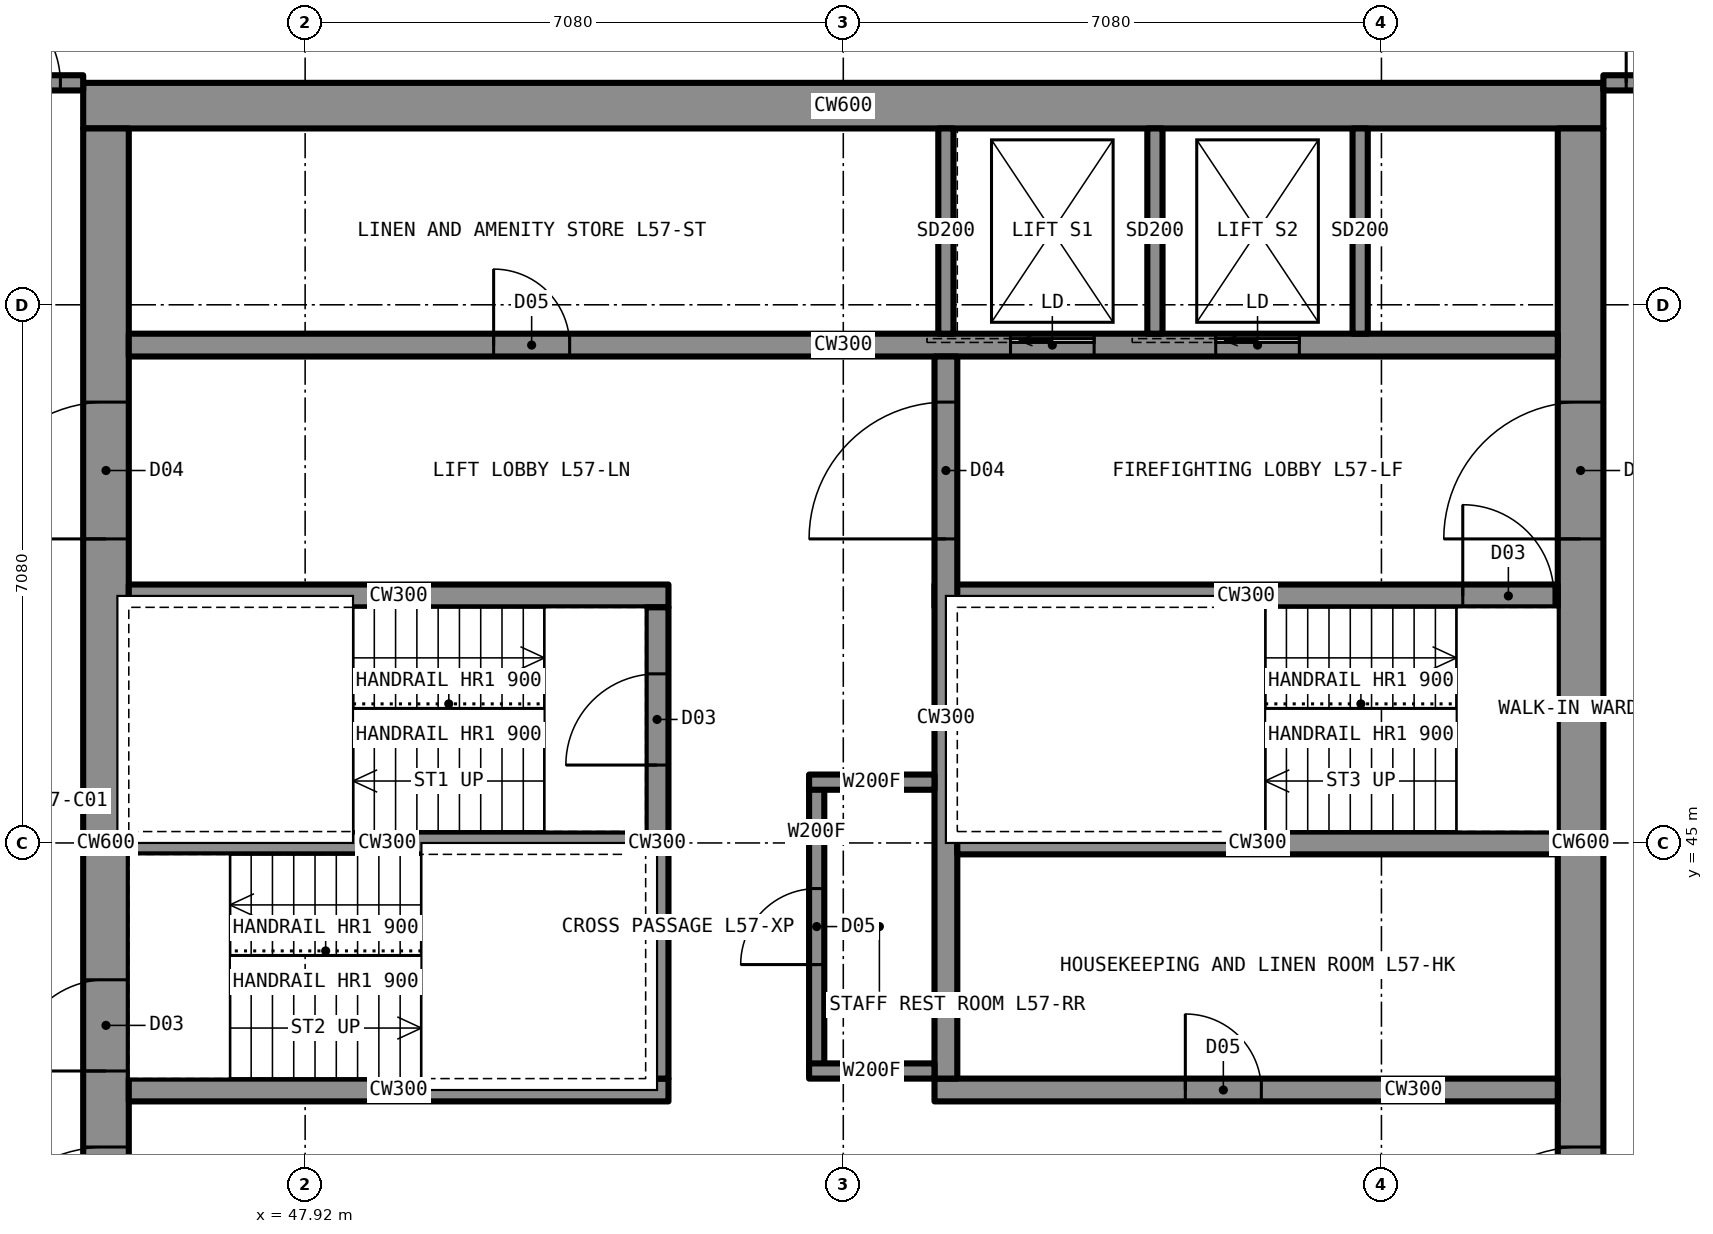
"""IFC4 building model, lengths in metres.
Left out: names, types, materials, properties, quantities, classifications, styles, units other than length and angle.
Written with IfcOpenShell. Run it as: python <this file> out.ifc"""

import sys

from ifc_helpers import new_model, si_unit, direction, frame, frame_2d, origin, place, context, subcontext, project, spatial, rectangle, extrude, element, fill, save


model = new_model("IFC4")
c1 = context("Model", 3, precision=1e-05, world=origin(), true_north=direction((0.0, 1.0)))
c2 = subcontext(c1, "Body", "Model", "MODEL_VIEW")
j1 = project(units=[si_unit("LENGTHUNIT", "METRE"), si_unit("PLANEANGLEUNIT", "RADIAN")], contexts=[c1])
p1 = place(None, origin())
s1 = spatial("IfcSite", under=j1, at=p1, CompositionType="ELEMENT")
p2 = place(p1, origin())
s2 = spatial("IfcBuilding", under=s1, at=p2, CompositionType="ELEMENT")
p3 = place(p2, frame((0.0, 0.0, 203.8)))
s3 = spatial("IfcBuildingStorey", under=s2, at=p3, CompositionType="ELEMENT", Elevation=203.8)
p4 = place(p3, frame((45.0, 54.7, 0.0), z_axis=(0.0, 0.0, 1.0), x_axis=(1.0, 0.0, 0.0)))
e1 = element("IfcWall", 1, at=p4, inside=s3, PredefinedType="SHEAR", context=c2, shape_type="SweptSolid", body=[
    extrude(rectangle(XDim=20.0, YDim=0.6, at=frame_2d((10.0, 0.0))), origin(), (0.0, 0.0, 1.0), 3.5),
])
p5 = place(p3, frame((64.7, 35.6, 0.0), z_axis=(0.0, 0.0, 1.0), x_axis=(0.0, 1.0, 0.0)))
e2 = element("IfcWall", 2, at=p5, inside=s3, PredefinedType="SHEAR", context=c2, shape_type="SweptSolid", body=[
    extrude(rectangle(XDim=18.8, YDim=0.6, at=frame_2d((9.4, 0.0))), origin(), (0.0, 0.0, 1.0), 3.5),
])
p6 = place(p5, frame((13.4, 0.0, 0.0)))
e3 = element("IfcOpeningElement", 3, at=p6, cuts=e2, PredefinedType="OPENING", context=c2, shape_type="SweptSolid", body=[
    extrude(rectangle(XDim=1.8, YDim=2.2, at=frame_2d((0.9, 1.1))), frame((0.0, 0.31, 0.0), z_axis=(0.0, -1.0, 0.0), x_axis=(1.0, 0.0, 0.0)), (0.0, 0.0, 1.0), 0.62),
])
p7 = place(p5, frame((3.6, 0.0, 0.0)))
e4 = element("IfcOpeningElement", 4, at=p7, cuts=e2, PredefinedType="OPENING", context=c2, shape_type="SweptSolid", body=[
    extrude(rectangle(XDim=1.8, YDim=2.2, at=frame_2d((0.9, 1.1))), frame((0.0, 0.31, 0.0), z_axis=(0.0, -1.0, 0.0), x_axis=(1.0, 0.0, 0.0)), (0.0, 0.0, 1.0), 0.62),
])
p8 = place(p3, frame((45.3, 35.6, 0.0), z_axis=(0.0, 0.0, 1.0), x_axis=(0.0, 1.0, 0.0)))
e5 = element("IfcWall", 5, at=p8, inside=s3, PredefinedType="SHEAR", context=c2, shape_type="SweptSolid", body=[
    extrude(rectangle(XDim=18.8, YDim=0.6, at=frame_2d((9.4, 0.0))), origin(), (0.0, 0.0, 1.0), 3.5),
])
p9 = place(p8, frame((13.4, 0.0, 0.0)))
e6 = element("IfcOpeningElement", 6, at=p9, cuts=e5, PredefinedType="OPENING", context=c2, shape_type="SweptSolid", body=[
    extrude(rectangle(XDim=1.8, YDim=2.2, at=frame_2d((0.9, 1.1))), frame((0.0, 0.31, 0.0), z_axis=(0.0, -1.0, 0.0), x_axis=(1.0, 0.0, 0.0)), (0.0, 0.0, 1.0), 0.62),
])
p10 = place(p8, frame((3.6, 0.0, 0.0)))
e7 = element("IfcOpeningElement", 7, at=p10, cuts=e5, PredefinedType="OPENING", context=c2, shape_type="SweptSolid", body=[
    extrude(rectangle(XDim=1.8, YDim=2.2, at=frame_2d((0.9, 1.1))), frame((0.0, 0.31, 0.0), z_axis=(0.0, -1.0, 0.0), x_axis=(1.0, 0.0, 0.0)), (0.0, 0.0, 1.0), 0.62),
])
p11 = place(p8, frame((6.4, 0.0, 0.0)))
e8 = element("IfcOpeningElement", 8, at=p11, cuts=e5, PredefinedType="OPENING", context=c2, shape_type="SweptSolid", body=[
    extrude(rectangle(XDim=1.2, YDim=2.2, at=frame_2d((0.6, 1.1))), frame((0.0, 0.31, 0.0), z_axis=(0.0, -1.0, 0.0), x_axis=(1.0, 0.0, 0.0)), (0.0, 0.0, 1.0), 0.62),
])
p12 = place(p3, frame((45.6, 51.55, 0.0), z_axis=(0.0, 0.0, 1.0), x_axis=(1.0, 0.0, 0.0)))
e9 = element("IfcWall", 9, at=p12, inside=s3, PredefinedType="SHEAR", context=c2, shape_type="SweptSolid", body=[
    extrude(rectangle(XDim=18.8, YDim=0.3, at=frame_2d((9.4, 0.0))), origin(), (0.0, 0.0, 1.0), 3.5),
])
p13 = place(p12, frame((4.8, 0.0, 0.0)))
e10 = element("IfcOpeningElement", 10, at=p13, cuts=e9, PredefinedType="OPENING", context=c2, shape_type="SweptSolid", body=[
    extrude(rectangle(XDim=1.0, YDim=2.1, at=frame_2d((0.5, 1.05))), frame((0.0, 0.16, 0.0), z_axis=(0.0, -1.0, 0.0), x_axis=(1.0, 0.0, 0.0)), (0.0, 0.0, 1.0), 0.32),
])
p14 = place(p12, frame((11.6, 0.0, 0.0)))
e11 = element("IfcOpeningElement", 11, at=p14, cuts=e9, PredefinedType="OPENING", context=c2, shape_type="SweptSolid", body=[
    extrude(rectangle(XDim=1.1, YDim=2.2, at=frame_2d((0.55, 1.1))), frame((0.0, 0.16, 0.0), z_axis=(0.0, -1.0, 0.0), x_axis=(1.0, 0.0, 0.0)), (0.0, 0.0, 1.0), 0.32),
])
p15 = place(p12, frame((14.3, 0.0, 0.0)))
e12 = element("IfcOpeningElement", 12, at=p15, cuts=e9, PredefinedType="OPENING", context=c2, shape_type="SweptSolid", body=[
    extrude(rectangle(XDim=1.1, YDim=2.2, at=frame_2d((0.55, 1.1))), frame((0.0, 0.16, 0.0), z_axis=(0.0, -1.0, 0.0), x_axis=(1.0, 0.0, 0.0)), (0.0, 0.0, 1.0), 0.32),
])
p16 = place(p3, frame((45.6, 48.25, 0.0), z_axis=(0.0, 0.0, 1.0), x_axis=(1.0, 0.0, 0.0)))
e13 = element("IfcWall", 13, at=p16, inside=s3, PredefinedType="SHEAR", context=c2, shape_type="SweptSolid", body=[
    extrude(rectangle(XDim=7.1, YDim=0.3, at=frame_2d((3.55, 0.0))), origin(), (0.0, 0.0, 1.0), 3.5),
])
p17 = place(p3, frame((56.2, 48.25, 0.0), z_axis=(0.0, 0.0, 1.0), x_axis=(1.0, 0.0, 0.0)))
e14 = element("IfcWall", 14, at=p17, inside=s3, PredefinedType="SHEAR", context=c2, shape_type="SweptSolid", body=[
    extrude(rectangle(XDim=8.2, YDim=0.3, at=frame_2d((4.1, 0.0))), origin(), (0.0, 0.0, 1.0), 3.5),
])
p18 = place(p17, frame((6.95, 0.0, 0.0)))
e15 = element("IfcOpeningElement", 15, at=p18, cuts=e14, PredefinedType="OPENING", context=c2, shape_type="SweptSolid", body=[
    extrude(rectangle(XDim=1.2, YDim=2.2, at=frame_2d((0.6, 1.1))), frame((0.0, 0.16, 0.0), z_axis=(0.0, -1.0, 0.0), x_axis=(1.0, 0.0, 0.0)), (0.0, 0.0, 1.0), 0.32),
])
p19 = place(p3, frame((45.6, 41.75, 0.0), z_axis=(0.0, 0.0, 1.0), x_axis=(1.0, 0.0, 0.0)))
e16 = element("IfcWall", 16, at=p19, inside=s3, PredefinedType="SHEAR", context=c2, shape_type="SweptSolid", body=[
    extrude(rectangle(XDim=7.1, YDim=0.3, at=frame_2d((3.55, 0.0))), origin(), (0.0, 0.0, 1.0), 3.5),
])
p20 = place(p3, frame((56.2, 41.75, 0.0), z_axis=(0.0, 0.0, 1.0), x_axis=(1.0, 0.0, 0.0)))
e17 = element("IfcWall", 17, at=p20, inside=s3, PredefinedType="SHEAR", context=c2, shape_type="SweptSolid", body=[
    extrude(rectangle(XDim=8.2, YDim=0.3, at=frame_2d((4.1, 0.0))), origin(), (0.0, 0.0, 1.0), 3.5),
])
p21 = place(p20, frame((3.3, 0.0, 0.0)))
e18 = element("IfcOpeningElement", 18, at=p21, cuts=e17, PredefinedType="OPENING", context=c2, shape_type="SweptSolid", body=[
    extrude(rectangle(XDim=1.0, YDim=2.1, at=frame_2d((0.5, 1.05))), frame((0.0, 0.16, 0.0), z_axis=(0.0, -1.0, 0.0), x_axis=(1.0, 0.0, 0.0)), (0.0, 0.0, 1.0), 0.32),
])
p22 = place(p3, frame((52.55, 41.9, 0.0), z_axis=(0.0, 0.0, 1.0), x_axis=(0.0, 1.0, 0.0)))
e19 = element("IfcWall", 19, at=p22, inside=s3, PredefinedType="SHEAR", context=c2, shape_type="SweptSolid", body=[
    extrude(rectangle(XDim=6.2, YDim=0.3, at=frame_2d((3.1, 0.0))), origin(), (0.0, 0.0, 1.0), 3.5),
])
p23 = place(p22, frame((4.125, 0.0, 0.0)))
e20 = element("IfcOpeningElement", 20, at=p23, cuts=e19, PredefinedType="OPENING", context=c2, shape_type="SweptSolid", body=[
    extrude(rectangle(XDim=1.2, YDim=2.2, at=frame_2d((0.6, 1.1))), frame((0.0, 0.16, 0.0), z_axis=(0.0, -1.0, 0.0), x_axis=(1.0, 0.0, 0.0)), (0.0, 0.0, 1.0), 0.32),
])
p24 = place(p3, frame((56.35, 41.9, 0.0), z_axis=(0.0, 0.0, 1.0), x_axis=(0.0, 1.0, 0.0)))
e21 = element("IfcWall", 21, at=p24, inside=s3, PredefinedType="SHEAR", context=c2, shape_type="SweptSolid", body=[
    extrude(rectangle(XDim=9.5, YDim=0.3, at=frame_2d((4.75, 0.0))), origin(), (0.0, 0.0, 1.0), 3.5),
])
p25 = place(p24, frame((7.1, 0.0, 0.0)))
e22 = element("IfcOpeningElement", 22, at=p25, cuts=e21, PredefinedType="OPENING", context=c2, shape_type="SweptSolid", body=[
    extrude(rectangle(XDim=1.8, YDim=2.2, at=frame_2d((0.9, 1.1))), frame((0.0, 0.16, 0.0), z_axis=(0.0, -1.0, 0.0), x_axis=(1.0, 0.0, 0.0)), (0.0, 0.0, 1.0), 0.32),
])
p26 = place(p3, frame((45.6, 45.0, 0.0), z_axis=(0.0, 0.0, 1.0), x_axis=(1.0, 0.0, 0.0)))
e23 = element("IfcWall", 23, at=p26, inside=s3, PredefinedType="SHEAR", context=c2, shape_type="SweptSolid", body=[
    extrude(rectangle(XDim=6.8, YDim=0.3, at=frame_2d((3.4, 0.0))), origin(), (0.0, 0.0, 1.0), 3.5),
])
p27 = place(p3, frame((56.5, 45.0, 0.0), z_axis=(0.0, 0.0, 1.0), x_axis=(1.0, 0.0, 0.0)))
e24 = element("IfcWall", 24, at=p27, inside=s3, PredefinedType="SHEAR", context=c2, shape_type="SweptSolid", body=[
    extrude(rectangle(XDim=7.9, YDim=0.3, at=frame_2d((3.95, 0.0))), origin(), (0.0, 0.0, 1.0), 3.5),
])
p28 = place(p3, frame((43.2, 55.0, 0.0), z_axis=(0.0, 0.0, 1.0), x_axis=(1.0, 0.0, 0.0)))
e25 = element("IfcWall", 25, at=p28, inside=s3, PredefinedType="PARTITIONING", context=c2, shape_type="SweptSolid", body=[
    extrude(rectangle(XDim=1.8, YDim=0.2, at=frame_2d((0.9, 0.0))), origin(), (0.0, 0.0, 1.0), 3.33),
])
p29 = place(p28, frame((0.3, 0.0, 0.0)))
e26 = element("IfcOpeningElement", 26, at=p29, cuts=e25, PredefinedType="OPENING", context=c2, shape_type="SweptSolid", body=[
    extrude(rectangle(XDim=1.2, YDim=2.2, at=frame_2d((0.6, 1.1))), frame((0.0, 0.11, 0.0), z_axis=(0.0, -1.0, 0.0), x_axis=(1.0, 0.0, 0.0)), (0.0, 0.0, 1.0), 0.22),
])
p30 = place(p3, frame((65.0, 55.0, 0.0), z_axis=(0.0, 0.0, 1.0), x_axis=(1.0, 0.0, 0.0)))
e27 = element("IfcWall", 27, at=p30, inside=s3, PredefinedType="PARTITIONING", context=c2, shape_type="SweptSolid", body=[
    extrude(rectangle(XDim=1.8, YDim=0.2, at=frame_2d((0.9, 0.0))), origin(), (0.0, 0.0, 1.0), 3.33),
])
p31 = place(p30, frame((0.3, 0.0, 0.0)))
e28 = element("IfcOpeningElement", 28, at=p31, cuts=e27, PredefinedType="OPENING", context=c2, shape_type="SweptSolid", body=[
    extrude(rectangle(XDim=1.2, YDim=2.2, at=frame_2d((0.6, 1.1))), frame((0.0, 0.11, 0.0), z_axis=(0.0, -1.0, 0.0), x_axis=(1.0, 0.0, 0.0)), (0.0, 0.0, 1.0), 0.22),
])
for number, where, z_axis, x_axis in (
    (29, (59.1, 51.7, 0.0), (0.0, 0.0, 1.0), (0.0, 1.0, 0.0)),
    (30, (61.8, 51.7, 0.0), (0.0, 0.0, 1.0), (0.0, 1.0, 0.0)),
    (31, (56.35, 51.7, 0.0), (0.0, 0.0, 1.0), (0.0, 1.0, 0.0)),
):
    element("IfcWall", number, at=place(p3, frame(where, z_axis=z_axis, x_axis=x_axis)), inside=s3, PredefinedType="PARTITIONING", context=c2, shape_type="SweptSolid", body=[
        extrude(rectangle(XDim=2.7, YDim=0.2, at=frame_2d((1.35, 0.0))), origin(), (0.0, 0.0, 1.0), 3.33),
    ])
p32 = place(p29, origin())
e32 = element("IfcDoor", 32, at=p32, inside=s3, OperationType="SINGLE_SWING_LEFT", PredefinedType="DOOR", context=c2, shape_type="SweptSolid", body=[
    extrude(rectangle(XDim=1.2, YDim=2.2, at=frame_2d((0.6, 1.1))), frame((0.0, 0.025, 0.0), z_axis=(0.0, -1.0, 0.0), x_axis=(1.0, 0.0, 0.0)), (0.0, 0.0, 1.0), 0.05),
])
fill(e26, e32)
p33 = place(p31, origin())
e33 = element("IfcDoor", 33, at=p33, inside=s3, OperationType="SINGLE_SWING_LEFT", PredefinedType="DOOR", context=c2, shape_type="SweptSolid", body=[
    extrude(rectangle(XDim=1.2, YDim=2.2, at=frame_2d((0.6, 1.1))), frame((0.0, 0.025, 0.0), z_axis=(0.0, -1.0, 0.0), x_axis=(1.0, 0.0, 0.0)), (0.0, 0.0, 1.0), 0.05),
])
fill(e28, e33)
p34 = place(p9, origin())
e34 = element("IfcDoor", 34, at=p34, inside=s3, OperationType="DOUBLE_DOOR_SINGLE_SWING", PredefinedType="DOOR", context=c2, shape_type="SweptSolid", body=[
    extrude(rectangle(XDim=1.8, YDim=2.2, at=frame_2d((0.9, 1.1))), frame((0.0, 0.025, 0.0), z_axis=(0.0, -1.0, 0.0), x_axis=(1.0, 0.0, 0.0)), (0.0, 0.0, 1.0), 0.05),
])
fill(e6, e34)
p35 = place(p10, origin())
e35 = element("IfcDoor", 35, at=p35, inside=s3, OperationType="DOUBLE_DOOR_SINGLE_SWING", PredefinedType="DOOR", context=c2, shape_type="SweptSolid", body=[
    extrude(rectangle(XDim=1.8, YDim=2.2, at=frame_2d((0.9, 1.1))), frame((0.0, 0.025, 0.0), z_axis=(0.0, -1.0, 0.0), x_axis=(1.0, 0.0, 0.0)), (0.0, 0.0, 1.0), 0.05),
])
fill(e7, e35)
p36 = place(p6, origin())
e36 = element("IfcDoor", 36, at=p36, inside=s3, OperationType="DOUBLE_DOOR_SINGLE_SWING", PredefinedType="DOOR", context=c2, shape_type="SweptSolid", body=[
    extrude(rectangle(XDim=1.8, YDim=2.2, at=frame_2d((0.9, 1.1))), frame((0.0, 0.025, 0.0), z_axis=(0.0, -1.0, 0.0), x_axis=(1.0, 0.0, 0.0)), (0.0, 0.0, 1.0), 0.05),
])
fill(e3, e36)
p37 = place(p7, origin())
e37 = element("IfcDoor", 37, at=p37, inside=s3, OperationType="DOUBLE_DOOR_SINGLE_SWING", PredefinedType="DOOR", context=c2, shape_type="SweptSolid", body=[
    extrude(rectangle(XDim=1.8, YDim=2.2, at=frame_2d((0.9, 1.1))), frame((0.0, 0.025, 0.0), z_axis=(0.0, -1.0, 0.0), x_axis=(1.0, 0.0, 0.0)), (0.0, 0.0, 1.0), 0.05),
])
fill(e4, e37)
p38 = place(p25, origin())
e38 = element("IfcDoor", 38, at=p38, inside=s3, OperationType="DOUBLE_DOOR_SINGLE_SWING", PredefinedType="DOOR", context=c2, shape_type="SweptSolid", body=[
    extrude(rectangle(XDim=1.8, YDim=2.2, at=frame_2d((0.9, 1.1))), frame((0.0, 0.025, 0.0), z_axis=(0.0, -1.0, 0.0), x_axis=(1.0, 0.0, 0.0)), (0.0, 0.0, 1.0), 0.05),
])
fill(e22, e38)
p39 = place(p23, origin())
e39 = element("IfcDoor", 39, at=p39, inside=s3, OperationType="SINGLE_SWING_LEFT", PredefinedType="DOOR", context=c2, shape_type="SweptSolid", body=[
    extrude(rectangle(XDim=1.2, YDim=2.2, at=frame_2d((0.6, 1.1))), frame((0.0, 0.025, 0.0), z_axis=(0.0, -1.0, 0.0), x_axis=(1.0, 0.0, 0.0)), (0.0, 0.0, 1.0), 0.05),
])
fill(e20, e39)
p40 = place(p11, origin())
e40 = element("IfcDoor", 40, at=p40, inside=s3, OperationType="SINGLE_SWING_LEFT", PredefinedType="DOOR", context=c2, shape_type="SweptSolid", body=[
    extrude(rectangle(XDim=1.2, YDim=2.2, at=frame_2d((0.6, 1.1))), frame((0.0, 0.025, 0.0), z_axis=(0.0, -1.0, 0.0), x_axis=(1.0, 0.0, 0.0)), (0.0, 0.0, 1.0), 0.05),
])
fill(e8, e40)
p41 = place(p18, origin())
e41 = element("IfcDoor", 41, at=p41, inside=s3, OperationType="SINGLE_SWING_LEFT", PredefinedType="DOOR", context=c2, shape_type="SweptSolid", body=[
    extrude(rectangle(XDim=1.2, YDim=2.2, at=frame_2d((0.6, 1.1))), frame((0.0, 0.025, 0.0), z_axis=(0.0, -1.0, 0.0), x_axis=(1.0, 0.0, 0.0)), (0.0, 0.0, 1.0), 0.05),
])
fill(e15, e41)
p42 = place(p21, origin())
e42 = element("IfcDoor", 42, at=p42, inside=s3, OperationType="SINGLE_SWING_LEFT", PredefinedType="DOOR", context=c2, shape_type="SweptSolid", body=[
    extrude(rectangle(XDim=1.0, YDim=2.1, at=frame_2d((0.5, 1.05))), frame((0.0, 0.025, 0.0), z_axis=(0.0, -1.0, 0.0), x_axis=(1.0, 0.0, 0.0)), (0.0, 0.0, 1.0), 0.05),
])
fill(e18, e42)
p43 = place(p13, origin())
e43 = element("IfcDoor", 43, at=p43, inside=s3, OperationType="SINGLE_SWING_LEFT", PredefinedType="DOOR", context=c2, shape_type="SweptSolid", body=[
    extrude(rectangle(XDim=1.0, YDim=2.1, at=frame_2d((0.5, 1.05))), frame((0.0, 0.025, 0.0), z_axis=(0.0, -1.0, 0.0), x_axis=(1.0, 0.0, 0.0)), (0.0, 0.0, 1.0), 0.05),
])
fill(e10, e43)
p44 = place(p14, origin())
e44 = element("IfcDoor", 44, at=p44, inside=s3, OperationType="SLIDING_TO_LEFT", PredefinedType="DOOR", context=c2, shape_type="SweptSolid", body=[
    extrude(rectangle(XDim=1.1, YDim=2.2, at=frame_2d((0.55, 1.1))), frame((0.0, 0.025, 0.0), z_axis=(0.0, -1.0, 0.0), x_axis=(1.0, 0.0, 0.0)), (0.0, 0.0, 1.0), 0.05),
])
fill(e11, e44)
p45 = place(p15, origin())
e45 = element("IfcDoor", 45, at=p45, inside=s3, OperationType="SLIDING_TO_LEFT", PredefinedType="DOOR", context=c2, shape_type="SweptSolid", body=[
    extrude(rectangle(XDim=1.1, YDim=2.2, at=frame_2d((0.55, 1.1))), frame((0.0, 0.025, 0.0), z_axis=(0.0, -1.0, 0.0), x_axis=(1.0, 0.0, 0.0)), (0.0, 0.0, 1.0), 0.05),
])
fill(e12, e45)
save(model, sys.argv[1])
